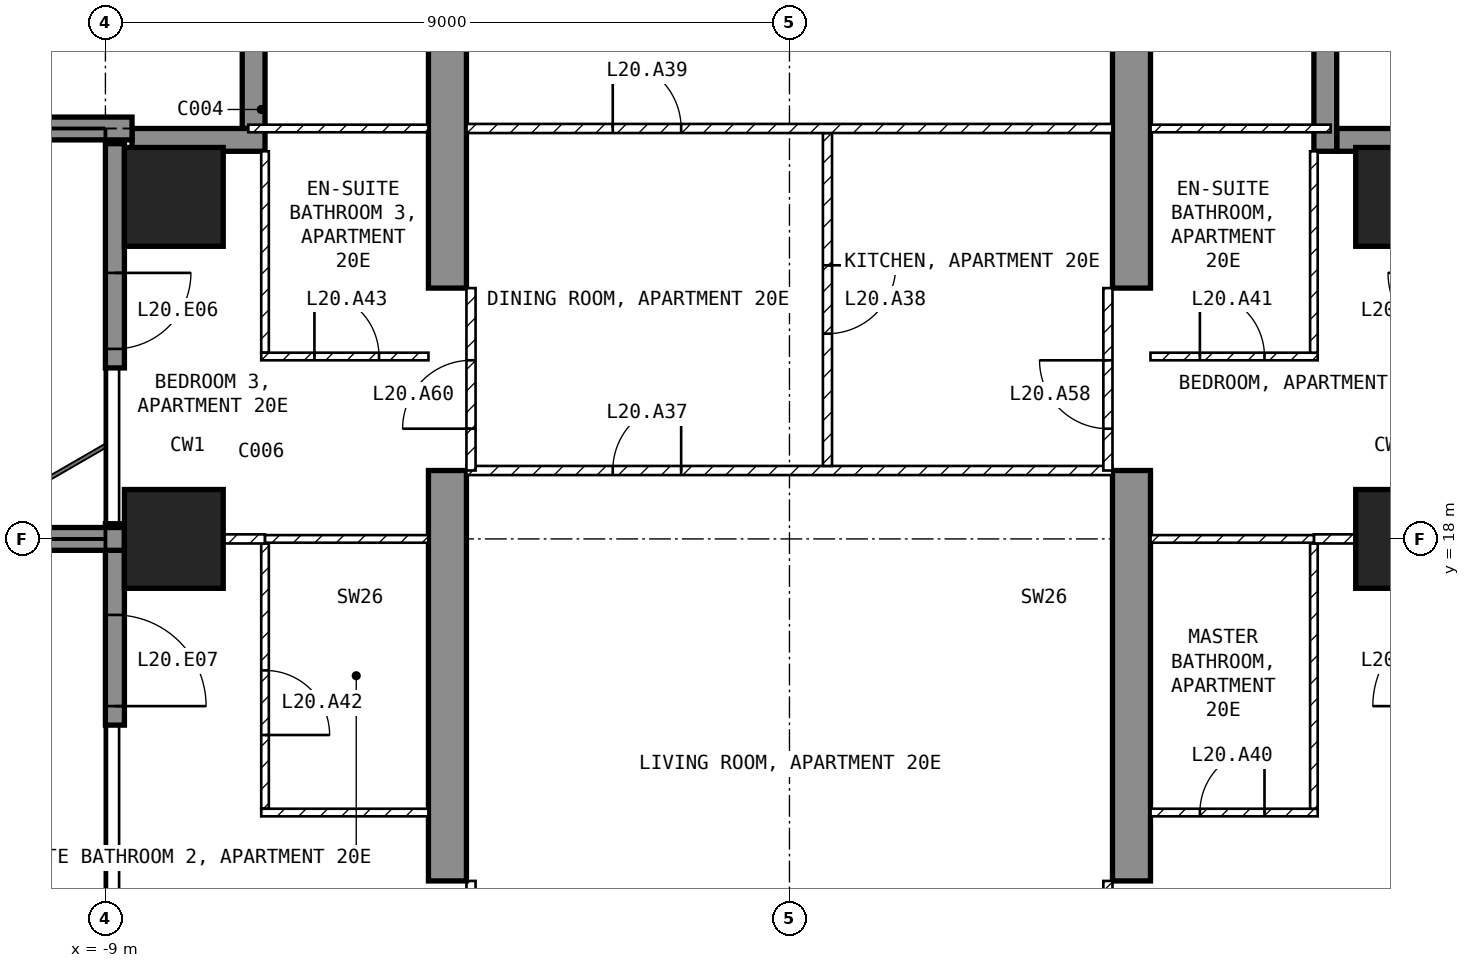
"""IFC4 building model, lengths in metres.
Left out: names, types, materials, properties, quantities, classifications, styles, units other than length and angle.
Written with IfcOpenShell. Run it as: python <this file> out.ifc"""

import sys

from ifc_helpers import new_model, si_unit, direction, frame, frame_2d, origin, origin_2d, place, context, subcontext, project, spatial, polyline, rectangle, outline, extrude, element, fill, save


model = new_model("IFC4")
c1 = context("Model", 3, precision=1e-05, world=origin(), true_north=direction((0.0, 1.0)))
c2 = subcontext(c1, "Body", "Model", "MODEL_VIEW")
j1 = project(units=[si_unit("LENGTHUNIT", "METRE"), si_unit("PLANEANGLEUNIT", "RADIAN")], contexts=[c1])
p1 = place(None, origin())
s1 = spatial("IfcSite", under=j1, at=p1, CompositionType="ELEMENT")
p2 = place(p1, origin())
s2 = spatial("IfcBuilding", under=s1, at=p2, CompositionType="ELEMENT")
p3 = place(p2, frame((0.0, 0.0, 89.0)))
s3 = spatial("IfcBuildingStorey", under=s2, at=p3, CompositionType="ELEMENT", Elevation=89.0)
for number, where, z_axis, x_axis in (
    (1, (-8.1, 18.0, -0.25), (0.0, 0.0, 1.0), (1.0, 0.0, 0.0)),
    (2, (-8.1, 22.5, -0.25), (0.0, 0.0, 1.0), (1.0, 0.0, 0.0)),
    (3, (8.1, 18.0, -0.25), (0.0, 0.0, 1.0), (1.0, 0.0, 0.0)),
    (4, (8.1, 22.5, -0.25), (0.0, 0.0, 1.0), (1.0, 0.0, 0.0)),
):
    element("IfcColumn", number, at=place(p3, frame(where, z_axis=z_axis, x_axis=x_axis)), inside=s3, PredefinedType="COLUMN", context=c2, shape_type="SweptSolid", body=[
        extrude(rectangle(XDim=1.3, YDim=1.3, at=origin_2d()), origin(), (0.0, 0.0, 1.0), 3.45),
    ])
for number, where, z_axis, x_axis in (
    (5, (-4.75, 9.0, -0.25), (1.0, 0.0, 0.0), (0.0, 1.0, 0.0)),
    (6, (4.25, 9.0, -0.25), (1.0, 0.0, 0.0), (0.0, 1.0, 0.0)),
):
    element("IfcWall", number, at=place(p3, frame(where, z_axis=z_axis, x_axis=x_axis)), inside=s3, PredefinedType="SHEAR", context=c2, shape_type="SweptSolid", body=[
        extrude(outline(polyline([(0.0, 0.0), (2.1, 0.0), (2.1, 2.65), (4.5, 2.65), (4.5, 0.0), (9.9, 0.0), (9.9, 2.65), (12.3, 2.65), (12.3, 0.0), (16.45, 0.0), (16.45, 3.45), (0.0, 3.45), (0.0, 0.0)])), origin(), (0.0, 0.0, 1.0), 0.5),
    ])
p4 = place(p3, frame((-8.875, 23.2, 0.0), z_axis=(0.0, 0.0, 1.0), x_axis=(0.0, -1.0, 0.0)))
e7 = element("IfcWall", 7, at=p4, inside=s3, PredefinedType="SOLIDWALL", context=c2, shape_type="SweptSolid", body=[
    extrude(rectangle(XDim=2.95, YDim=0.25, at=frame_2d((1.475, 0.0))), origin(), (0.0, 0.0, 1.0), 3.2),
])
p5 = place(p4, frame((1.7, 0.0, 0.0)))
e8 = element("IfcOpeningElement", 8, at=p5, cuts=e7, PredefinedType="OPENING", context=c2, shape_type="SweptSolid", body=[
    extrude(rectangle(XDim=1.0, YDim=2.4, at=frame_2d((0.5, 1.2))), frame((0.0, 0.135, 0.0), z_axis=(0.0, -1.0, 0.0), x_axis=(1.0, 0.0, 0.0)), (0.0, 0.0, 1.0), 0.27),
])
p6 = place(p3, frame((-8.875, 18.2, 0.0), z_axis=(0.0, 0.0, 1.0), x_axis=(0.0, -1.0, 0.0)))
e9 = element("IfcWall", 9, at=p6, inside=s3, PredefinedType="SOLIDWALL", context=c2, shape_type="SweptSolid", body=[
    extrude(rectangle(XDim=2.65, YDim=0.25, at=frame_2d((1.325, 0.0))), origin(), (0.0, 0.0, 1.0), 3.2),
])
p7 = place(p6, frame((1.2, 0.0, 0.0)))
e10 = element("IfcOpeningElement", 10, at=p7, cuts=e9, PredefinedType="OPENING", context=c2, shape_type="SweptSolid", body=[
    extrude(rectangle(XDim=1.2, YDim=2.4, at=frame_2d((0.6, 1.2))), frame((0.0, 0.135, 0.0), z_axis=(0.0, -1.0, 0.0), x_axis=(1.0, 0.0, 0.0)), (0.0, 0.0, 1.0), 0.27),
])
p8 = place(p3, frame((8.65, 23.25, 0.0), z_axis=(0.0, 0.0, 1.0), x_axis=(-1.0, 0.0, 0.0)))
e11 = element("IfcWall", 11, at=p8, inside=s3, PredefinedType="SOLIDWALL", context=c2, shape_type="SweptSolid", body=[
    extrude(rectangle(XDim=1.45, YDim=0.3, at=frame_2d((0.725, 0.0))), origin(), (0.0, 0.0, 1.0), 3.2),
])
p9 = place(p3, frame((7.05, 23.1, 0.0), z_axis=(0.0, 0.0, 1.0), x_axis=(0.0, 1.0, 0.0)))
e12 = element("IfcWall", 12, at=p9, inside=s3, PredefinedType="SOLIDWALL", context=c2, shape_type="SweptSolid", body=[
    extrude(rectangle(XDim=1.8, YDim=0.3, at=frame_2d((0.9, 0.0))), origin(), (0.0, 0.0, 1.0), 3.2),
])
p10 = place(p3, frame((-7.05, 25.2, 0.0), z_axis=(0.0, 0.0, 1.0), x_axis=(0.0, -1.0, 0.0)))
e13 = element("IfcWall", 13, at=p10, inside=s3, PredefinedType="SOLIDWALL", context=c2, shape_type="SweptSolid", body=[
    extrude(rectangle(XDim=1.8, YDim=0.3, at=frame_2d((0.9, 0.0))), origin(), (0.0, 0.0, 1.0), 3.2),
])
p11 = place(p3, frame((-6.9, 23.25, 0.0), z_axis=(0.0, 0.0, 1.0), x_axis=(-1.0, 0.0, 0.0)))
e14 = element("IfcWall", 14, at=p11, inside=s3, PredefinedType="SOLIDWALL", context=c2, shape_type="SweptSolid", body=[
    extrude(rectangle(XDim=1.75, YDim=0.3, at=frame_2d((0.875, 0.0))), origin(), (0.0, 0.0, 1.0), 3.2),
])
p12 = place(p3, frame((-8.75, 18.0, 0.0), z_axis=(0.0, 0.0, 1.0), x_axis=(-1.0, 0.0, 0.0)))
e15 = element("IfcWall", 15, at=p12, inside=s3, PredefinedType="SOLIDWALL", context=c2, shape_type="SweptSolid", body=[
    extrude(rectangle(XDim=2.95, YDim=0.3, at=frame_2d((1.475, 0.0))), origin(), (0.0, 0.0, 1.0), 3.2),
])
p13 = place(p3, frame((-8.65, 23.4, 0.0), z_axis=(0.0, 0.0, 1.0), x_axis=(-1.0, 0.0, 0.0)))
e16 = element("IfcWall", 16, at=p13, inside=s3, PredefinedType="SOLIDWALL", context=c2, shape_type="SweptSolid", body=[
    extrude(rectangle(XDim=3.05, YDim=0.3, at=frame_2d((1.525, 0.0))), origin(), (0.0, 0.0, 1.0), 3.2),
])
p14 = place(p3, frame((-4.25, 18.9, 0.0), z_axis=(0.0, 0.0, 1.0), x_axis=(1.0, 0.0, 0.0)))
e17 = element("IfcWall", 17, at=p14, inside=s3, PredefinedType="PARTITIONING", context=c2, shape_type="SweptSolid", body=[
    extrude(rectangle(XDim=8.5, YDim=0.12, at=frame_2d((4.25, 0.0))), origin(), (0.0, 0.0, 1.0), 3.2),
])
p15 = place(p14, frame((1.925, 0.0, 0.0)))
e18 = element("IfcOpeningElement", 18, at=p15, cuts=e17, PredefinedType="OPENING", context=c2, shape_type="SweptSolid", body=[
    extrude(rectangle(XDim=0.9, YDim=2.1, at=frame_2d((0.45, 1.05))), frame((0.0, 0.07, 0.0), z_axis=(0.0, -1.0, 0.0), x_axis=(1.0, 0.0, 0.0)), (0.0, 0.0, 1.0), 0.14),
])
p16 = place(p3, frame((0.5, 23.34, 0.0), z_axis=(0.0, 0.0, 1.0), x_axis=(0.0, -1.0, 0.0)))
e19 = element("IfcWall", 19, at=p16, inside=s3, PredefinedType="PARTITIONING", context=c2, shape_type="SweptSolid", body=[
    extrude(rectangle(XDim=4.38, YDim=0.12, at=frame_2d((2.19, 0.0))), origin(), (0.0, 0.0, 1.0), 3.2),
])
p17 = place(p16, frame((1.74, 0.0, 0.0)))
e20 = element("IfcOpeningElement", 20, at=p17, cuts=e19, PredefinedType="OPENING", context=c2, shape_type="SweptSolid", body=[
    extrude(rectangle(XDim=0.9, YDim=2.1, at=frame_2d((0.45, 1.05))), frame((0.0, 0.07, 0.0), z_axis=(0.0, -1.0, 0.0), x_axis=(1.0, 0.0, 0.0)), (0.0, 0.0, 1.0), 0.14),
])
p18 = place(p3, frame((-4.25, 23.4, 0.0), z_axis=(0.0, 0.0, 1.0), x_axis=(1.0, 0.0, 0.0)))
e21 = element("IfcWall", 21, at=p18, inside=s3, PredefinedType="PARTITIONING", context=c2, shape_type="SweptSolid", body=[
    extrude(rectangle(XDim=8.5, YDim=0.12, at=frame_2d((4.25, 0.0))), origin(), (0.0, 0.0, 1.0), 3.2),
])
p19 = place(p18, frame((1.925, 0.0, 0.0)))
e22 = element("IfcOpeningElement", 22, at=p19, cuts=e21, PredefinedType="OPENING", context=c2, shape_type="SweptSolid", body=[
    extrude(rectangle(XDim=0.9, YDim=2.1, at=frame_2d((0.45, 1.05))), frame((0.0, 0.07, 0.0), z_axis=(0.0, -1.0, 0.0), x_axis=(1.0, 0.0, 0.0)), (0.0, 0.0, 1.0), 0.14),
])
p20 = place(p3, frame((4.75, 14.4, 0.0), z_axis=(0.0, 0.0, 1.0), x_axis=(1.0, 0.0, 0.0)))
e23 = element("IfcWall", 23, at=p20, inside=s3, PredefinedType="PARTITIONING", context=c2, shape_type="SweptSolid", body=[
    extrude(rectangle(XDim=2.2, YDim=0.1, at=frame_2d((1.1, 0.0))), origin(), (0.0, 0.0, 1.0), 3.2),
])
p21 = place(p20, frame((0.65, 0.0, 0.0)))
e24 = element("IfcOpeningElement", 24, at=p21, cuts=e23, PredefinedType="OPENING", context=c2, shape_type="SweptSolid", body=[
    extrude(rectangle(XDim=0.85, YDim=2.1, at=frame_2d((0.425, 1.05))), frame((0.0, 0.06, 0.0), z_axis=(0.0, -1.0, 0.0), x_axis=(1.0, 0.0, 0.0)), (0.0, 0.0, 1.0), 0.12),
])
p22 = place(p3, frame((6.9, 14.45, 0.0), z_axis=(0.0, 0.0, 1.0), x_axis=(0.0, 1.0, 0.0)))
e25 = element("IfcWall", 25, at=p22, inside=s3, PredefinedType="PARTITIONING", context=c2, shape_type="SweptSolid", body=[
    extrude(rectangle(XDim=3.49, YDim=0.1, at=frame_2d((1.745, 0.0))), origin(), (0.0, 0.0, 1.0), 3.2),
])
p23 = place(p3, frame((6.9, 18.0, 0.0), z_axis=(0.0, 0.0, 1.0), x_axis=(1.0, 0.0, 0.0)))
e26 = element("IfcWall", 26, at=p23, inside=s3, PredefinedType="PARTITIONING", context=c2, shape_type="SweptSolid", body=[
    extrude(rectangle(XDim=0.55, YDim=0.12, at=frame_2d((0.275, 0.0))), origin(), (0.0, 0.0, 1.0), 2.296),
])
p24 = place(p3, frame((4.75, 18.0, 0.0), z_axis=(0.0, 0.0, 1.0), x_axis=(1.0, 0.0, 0.0)))
e27 = element("IfcWall", 27, at=p24, inside=s3, PredefinedType="PARTITIONING", context=c2, shape_type="SweptSolid", body=[
    extrude(rectangle(XDim=2.15, YDim=0.1, at=frame_2d((1.075, 0.0))), origin(), (0.0, 0.0, 1.0), 2.296),
])
p25 = place(p3, frame((4.75, 20.4, 0.0), z_axis=(0.0, 0.0, 1.0), x_axis=(1.0, 0.0, 0.0)))
e28 = element("IfcWall", 28, at=p25, inside=s3, PredefinedType="PARTITIONING", context=c2, shape_type="SweptSolid", body=[
    extrude(rectangle(XDim=2.2, YDim=0.1, at=frame_2d((1.1, 0.0))), origin(), (0.0, 0.0, 1.0), 3.2),
])
p26 = place(p25, frame((0.65, 0.0, 0.0)))
e29 = element("IfcOpeningElement", 29, at=p26, cuts=e28, PredefinedType="OPENING", context=c2, shape_type="SweptSolid", body=[
    extrude(rectangle(XDim=0.85, YDim=2.1, at=frame_2d((0.425, 1.05))), frame((0.0, 0.06, 0.0), z_axis=(0.0, -1.0, 0.0), x_axis=(1.0, 0.0, 0.0)), (0.0, 0.0, 1.0), 0.12),
])
p27 = place(p3, frame((6.9, 20.45, 0.0), z_axis=(0.0, 0.0, 1.0), x_axis=(0.0, 1.0, 0.0)))
e30 = element("IfcWall", 30, at=p27, inside=s3, PredefinedType="PARTITIONING", context=c2, shape_type="SweptSolid", body=[
    extrude(rectangle(XDim=2.65, YDim=0.1, at=frame_2d((1.325, 0.0))), origin(), (0.0, 0.0, 1.0), 3.2),
])
p28 = place(p3, frame((4.75, 23.4, 0.0), z_axis=(0.0, 0.0, 1.0), x_axis=(1.0, 0.0, 0.0)))
e31 = element("IfcWall", 31, at=p28, inside=s3, PredefinedType="PARTITIONING", context=c2, shape_type="SweptSolid", body=[
    extrude(rectangle(XDim=2.37, YDim=0.1, at=frame_2d((1.185, 0.0))), origin(), (0.0, 0.0, 1.0), 3.2),
])
p29 = place(p3, frame((-6.9, 17.94, 0.0), z_axis=(0.0, 0.0, 1.0), x_axis=(0.0, -1.0, 0.0)))
e32 = element("IfcWall", 32, at=p29, inside=s3, PredefinedType="PARTITIONING", context=c2, shape_type="SweptSolid", body=[
    extrude(rectangle(XDim=3.49, YDim=0.1, at=frame_2d((1.745, 0.0))), origin(), (0.0, 0.0, 1.0), 3.2),
])
p30 = place(p29, frame((1.67, 0.0, 0.0)))
e33 = element("IfcOpeningElement", 33, at=p30, cuts=e32, PredefinedType="OPENING", context=c2, shape_type="SweptSolid", body=[
    extrude(rectangle(XDim=0.85, YDim=2.1, at=frame_2d((0.425, 1.05))), frame((0.0, 0.06, 0.0), z_axis=(0.0, -1.0, 0.0), x_axis=(1.0, 0.0, 0.0)), (0.0, 0.0, 1.0), 0.12),
])
p31 = place(p3, frame((-6.95, 14.4, 0.0), z_axis=(0.0, 0.0, 1.0), x_axis=(1.0, 0.0, 0.0)))
e34 = element("IfcWall", 34, at=p31, inside=s3, PredefinedType="PARTITIONING", context=c2, shape_type="SweptSolid", body=[
    extrude(rectangle(XDim=2.2, YDim=0.1, at=frame_2d((1.1, 0.0))), origin(), (0.0, 0.0, 1.0), 3.2),
])
p32 = place(p3, frame((-7.45, 18.0, 0.0), z_axis=(0.0, 0.0, 1.0), x_axis=(1.0, 0.0, 0.0)))
e35 = element("IfcWall", 35, at=p32, inside=s3, PredefinedType="PARTITIONING", context=c2, shape_type="SweptSolid", body=[
    extrude(rectangle(XDim=0.55, YDim=0.12, at=frame_2d((0.275, 0.0))), origin(), (0.0, 0.0, 1.0), 2.296),
])
p33 = place(p3, frame((-6.9, 18.0, 0.0), z_axis=(0.0, 0.0, 1.0), x_axis=(1.0, 0.0, 0.0)))
e36 = element("IfcWall", 36, at=p33, inside=s3, PredefinedType="PARTITIONING", context=c2, shape_type="SweptSolid", body=[
    extrude(rectangle(XDim=2.15, YDim=0.1, at=frame_2d((1.075, 0.0))), origin(), (0.0, 0.0, 1.0), 2.296),
])
p34 = place(p3, frame((-6.9, 23.1, 0.0), z_axis=(0.0, 0.0, 1.0), x_axis=(0.0, -1.0, 0.0)))
e37 = element("IfcWall", 37, at=p34, inside=s3, PredefinedType="PARTITIONING", context=c2, shape_type="SweptSolid", body=[
    extrude(rectangle(XDim=2.65, YDim=0.1, at=frame_2d((1.325, 0.0))), origin(), (0.0, 0.0, 1.0), 3.2),
])
p35 = place(p3, frame((-6.95, 20.4, 0.0), z_axis=(0.0, 0.0, 1.0), x_axis=(1.0, 0.0, 0.0)))
e38 = element("IfcWall", 38, at=p35, inside=s3, PredefinedType="PARTITIONING", context=c2, shape_type="SweptSolid", body=[
    extrude(rectangle(XDim=2.2, YDim=0.1, at=frame_2d((1.1, 0.0))), origin(), (0.0, 0.0, 1.0), 3.2),
])
p36 = place(p35, frame((0.7, 0.0, 0.0)))
e39 = element("IfcOpeningElement", 39, at=p36, cuts=e38, PredefinedType="OPENING", context=c2, shape_type="SweptSolid", body=[
    extrude(rectangle(XDim=0.85, YDim=2.1, at=frame_2d((0.425, 1.05))), frame((0.0, 0.06, 0.0), z_axis=(0.0, -1.0, 0.0), x_axis=(1.0, 0.0, 0.0)), (0.0, 0.0, 1.0), 0.12),
])
p37 = place(p3, frame((-7.12, 23.4, 0.0), z_axis=(0.0, 0.0, 1.0), x_axis=(1.0, 0.0, 0.0)))
e40 = element("IfcWall", 40, at=p37, inside=s3, PredefinedType="PARTITIONING", context=c2, shape_type="SweptSolid", body=[
    extrude(rectangle(XDim=2.37, YDim=0.1, at=frame_2d((1.185, 0.0))), origin(), (0.0, 0.0, 1.0), 3.2),
])
p38 = place(p3, frame((4.19, 11.1, 0.0), z_axis=(0.0, 0.0, 1.0), x_axis=(0.0, 1.0, 0.0)))
e41 = element("IfcWall", 41, at=p38, inside=s3, PredefinedType="PARTITIONING", context=c2, shape_type="SweptSolid", body=[
    extrude(rectangle(XDim=2.4, YDim=0.12, at=frame_2d((1.2, 0.0))), origin(), (0.0, 0.0, 1.0), 2.4),
])
p39 = place(p38, frame((0.75, 0.0, 0.0)))
e42 = element("IfcOpeningElement", 42, at=p39, cuts=e41, PredefinedType="OPENING", context=c2, shape_type="SweptSolid", body=[
    extrude(rectangle(XDim=0.9, YDim=2.1, at=frame_2d((0.45, 1.05))), frame((0.0, 0.07, 0.0), z_axis=(0.0, -1.0, 0.0), x_axis=(1.0, 0.0, 0.0)), (0.0, 0.0, 1.0), 0.14),
])
p40 = place(p3, frame((4.19, 18.9, 0.0), z_axis=(0.0, 0.0, 1.0), x_axis=(0.0, 1.0, 0.0)))
e43 = element("IfcWall", 43, at=p40, inside=s3, PredefinedType="PARTITIONING", context=c2, shape_type="SweptSolid", body=[
    extrude(rectangle(XDim=2.4, YDim=0.12, at=frame_2d((1.2, 0.0))), origin(), (0.0, 0.0, 1.0), 2.4),
])
p41 = place(p40, frame((0.55, 0.0, 0.0)))
e44 = element("IfcOpeningElement", 44, at=p41, cuts=e43, PredefinedType="OPENING", context=c2, shape_type="SweptSolid", body=[
    extrude(rectangle(XDim=0.9, YDim=2.1, at=frame_2d((0.45, 1.05))), frame((0.0, 0.07, 0.0), z_axis=(0.0, -1.0, 0.0), x_axis=(1.0, 0.0, 0.0)), (0.0, 0.0, 1.0), 0.14),
])
p42 = place(p3, frame((-4.19, 11.1, 0.0), z_axis=(0.0, 0.0, 1.0), x_axis=(0.0, 1.0, 0.0)))
e45 = element("IfcWall", 45, at=p42, inside=s3, PredefinedType="PARTITIONING", context=c2, shape_type="SweptSolid", body=[
    extrude(rectangle(XDim=2.4, YDim=0.12, at=frame_2d((1.2, 0.0))), origin(), (0.0, 0.0, 1.0), 2.4),
])
p43 = place(p42, frame((0.75, 0.0, 0.0)))
e46 = element("IfcOpeningElement", 46, at=p43, cuts=e45, PredefinedType="OPENING", context=c2, shape_type="SweptSolid", body=[
    extrude(rectangle(XDim=0.9, YDim=2.1, at=frame_2d((0.45, 1.05))), frame((0.0, 0.07, 0.0), z_axis=(0.0, -1.0, 0.0), x_axis=(1.0, 0.0, 0.0)), (0.0, 0.0, 1.0), 0.14),
])
p44 = place(p3, frame((-4.19, 18.9, 0.0), z_axis=(0.0, 0.0, 1.0), x_axis=(0.0, 1.0, 0.0)))
e47 = element("IfcWall", 47, at=p44, inside=s3, PredefinedType="PARTITIONING", context=c2, shape_type="SweptSolid", body=[
    extrude(rectangle(XDim=2.4, YDim=0.12, at=frame_2d((1.2, 0.0))), origin(), (0.0, 0.0, 1.0), 2.4),
])
p45 = place(p44, frame((0.55, 0.0, 0.0)))
e48 = element("IfcOpeningElement", 48, at=p45, cuts=e47, PredefinedType="OPENING", context=c2, shape_type="SweptSolid", body=[
    extrude(rectangle(XDim=0.9, YDim=2.1, at=frame_2d((0.45, 1.05))), frame((0.0, 0.07, 0.0), z_axis=(0.0, -1.0, 0.0), x_axis=(1.0, 0.0, 0.0)), (0.0, 0.0, 1.0), 0.14),
])
p46 = place(p5, origin())
e49 = element("IfcDoor", 49, at=p46, inside=s3, OperationType="SINGLE_SWING_LEFT", PredefinedType="DOOR", context=c2, shape_type="SweptSolid", body=[
    extrude(rectangle(XDim=1.0, YDim=2.4, at=frame_2d((0.5, 1.2))), frame((0.0, 0.025, 0.0), z_axis=(0.0, -1.0, 0.0), x_axis=(1.0, 0.0, 0.0)), (0.0, 0.0, 1.0), 0.05),
])
fill(e8, e49)
p47 = place(p7, origin())
e50 = element("IfcDoor", 50, at=p47, inside=s3, OperationType="SINGLE_SWING_RIGHT", PredefinedType="DOOR", context=c2, shape_type="SweptSolid", body=[
    extrude(rectangle(XDim=1.2, YDim=2.4, at=frame_2d((0.6, 1.2))), frame((0.0, 0.025, 0.0), z_axis=(0.0, -1.0, 0.0), x_axis=(1.0, 0.0, 0.0)), (0.0, 0.0, 1.0), 0.05),
])
fill(e10, e50)
p48 = place(p15, origin())
e51 = element("IfcDoor", 51, at=p48, inside=s3, OperationType="SINGLE_SWING_RIGHT", PredefinedType="DOOR", context=c2, shape_type="SweptSolid", body=[
    extrude(rectangle(XDim=0.9, YDim=2.1, at=frame_2d((0.45, 1.05))), frame((0.0, 0.025, 0.0), z_axis=(0.0, -1.0, 0.0), x_axis=(1.0, 0.0, 0.0)), (0.0, 0.0, 1.0), 0.05),
])
fill(e18, e51)
p49 = place(p17, origin())
e52 = element("IfcDoor", 52, at=p49, inside=s3, OperationType="SINGLE_SWING_LEFT", PredefinedType="DOOR", context=c2, shape_type="SweptSolid", body=[
    extrude(rectangle(XDim=0.9, YDim=2.1, at=frame_2d((0.45, 1.05))), frame((0.0, 0.025, 0.0), z_axis=(0.0, -1.0, 0.0), x_axis=(1.0, 0.0, 0.0)), (0.0, 0.0, 1.0), 0.05),
])
fill(e20, e52)
p50 = place(p19, origin())
e53 = element("IfcDoor", 53, at=p50, inside=s3, OperationType="SINGLE_SWING_LEFT", PredefinedType="DOOR", context=c2, shape_type="SweptSolid", body=[
    extrude(rectangle(XDim=0.9, YDim=2.1, at=frame_2d((0.45, 1.05))), frame((0.0, 0.025, 0.0), z_axis=(0.0, -1.0, 0.0), x_axis=(1.0, 0.0, 0.0)), (0.0, 0.0, 1.0), 0.05),
])
fill(e22, e53)
p51 = place(p21, origin())
e54 = element("IfcDoor", 54, at=p51, inside=s3, OperationType="SINGLE_SWING_RIGHT", PredefinedType="DOOR", context=c2, shape_type="SweptSolid", body=[
    extrude(rectangle(XDim=0.85, YDim=2.1, at=frame_2d((0.425, 1.05))), frame((0.0, 0.025, 0.0), z_axis=(0.0, -1.0, 0.0), x_axis=(1.0, 0.0, 0.0)), (0.0, 0.0, 1.0), 0.05),
])
fill(e24, e54)
p52 = place(p26, origin())
e55 = element("IfcDoor", 55, at=p52, inside=s3, OperationType="SINGLE_SWING_LEFT", PredefinedType="DOOR", context=c2, shape_type="SweptSolid", body=[
    extrude(rectangle(XDim=0.85, YDim=2.1, at=frame_2d((0.425, 1.05))), frame((0.0, 0.025, 0.0), z_axis=(0.0, -1.0, 0.0), x_axis=(1.0, 0.0, 0.0)), (0.0, 0.0, 1.0), 0.05),
])
fill(e29, e55)
p53 = place(p30, origin())
e56 = element("IfcDoor", 56, at=p53, inside=s3, OperationType="SINGLE_SWING_RIGHT", PredefinedType="DOOR", context=c2, shape_type="SweptSolid", body=[
    extrude(rectangle(XDim=0.85, YDim=2.1, at=frame_2d((0.425, 1.05))), frame((0.0, 0.025, 0.0), z_axis=(0.0, -1.0, 0.0), x_axis=(1.0, 0.0, 0.0)), (0.0, 0.0, 1.0), 0.05),
])
fill(e33, e56)
p54 = place(p36, origin())
e57 = element("IfcDoor", 57, at=p54, inside=s3, OperationType="SINGLE_SWING_LEFT", PredefinedType="DOOR", context=c2, shape_type="SweptSolid", body=[
    extrude(rectangle(XDim=0.85, YDim=2.1, at=frame_2d((0.425, 1.05))), frame((0.0, 0.025, 0.0), z_axis=(0.0, -1.0, 0.0), x_axis=(1.0, 0.0, 0.0)), (0.0, 0.0, 1.0), 0.05),
])
fill(e39, e57)
p55 = place(p41, origin())
e58 = element("IfcDoor", 58, at=p55, inside=s3, OperationType="SINGLE_SWING_RIGHT", PredefinedType="DOOR", context=c2, shape_type="SweptSolid", body=[
    extrude(rectangle(XDim=0.9, YDim=2.1, at=frame_2d((0.45, 1.05))), frame((0.0, 0.025, 0.0), z_axis=(0.0, -1.0, 0.0), x_axis=(1.0, 0.0, 0.0)), (0.0, 0.0, 1.0), 0.05),
])
fill(e44, e58)
p56 = place(p45, origin())
e59 = element("IfcDoor", 59, at=p56, inside=s3, OperationType="SINGLE_SWING_LEFT", PredefinedType="DOOR", context=c2, shape_type="SweptSolid", body=[
    extrude(rectangle(XDim=0.9, YDim=2.1, at=frame_2d((0.45, 1.05))), frame((0.0, 0.025, 0.0), z_axis=(0.0, -1.0, 0.0), x_axis=(1.0, 0.0, 0.0)), (0.0, 0.0, 1.0), 0.05),
])
fill(e48, e59)
save(model, sys.argv[1])
